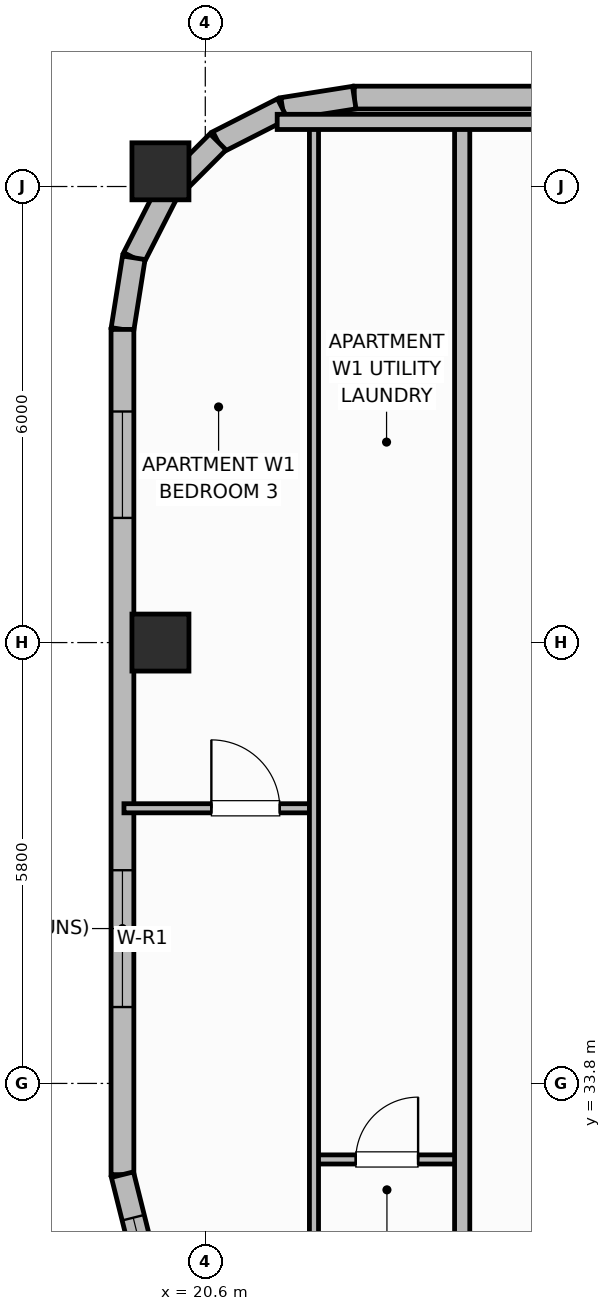
"""IFC4 building model, lengths in metres.
Left out: names, types, materials, properties, quantities, classifications, styles, units other than length and angle.
Written with IfcOpenShell. Run it as: python <this file> out.ifc"""

import sys

from ifc_helpers import new_model, si_unit, direction, frame, frame_2d, origin, origin_2d, place, context, subcontext, project, spatial, rectangle, extrude, element, fill, save


model = new_model("IFC4")
c1 = context("Model", 3, precision=1e-05, world=origin(), true_north=direction((0.0, 1.0)))
c2 = subcontext(c1, "Body", "Model", "MODEL_VIEW")
j1 = project(units=[si_unit("LENGTHUNIT", "METRE"), si_unit("PLANEANGLEUNIT", "RADIAN")], contexts=[c1])
p1 = place(None, origin())
s1 = spatial("IfcSite", under=j1, at=p1, CompositionType="ELEMENT")
p2 = place(p1, origin())
s2 = spatial("IfcBuilding", under=s1, at=p2, CompositionType="ELEMENT")
p3 = place(p2, frame((0.0, 0.0, 263.9)))
s3 = spatial("IfcBuildingStorey", under=s2, at=p3, CompositionType="ELEMENT", Elevation=263.9)
for number, where, z_axis, x_axis in (
    (1, (20.01, 39.6, 0.0), (0.0, 0.0, 1.0), (1.0, 0.0, 0.0)),
    (2, (20.01, 45.8, 0.0), (0.0, 0.0, 1.0), (1.0, 0.0, 0.0)),
):
    element("IfcColumn", number, at=place(p3, frame(where, z_axis=z_axis, x_axis=x_axis)), inside=s3, PredefinedType="COLUMN", context=c2, shape_type="SweptSolid", body=[
        extrude(rectangle(XDim=0.75, YDim=0.75, at=origin_2d()), origin(), (0.0, 0.0, 1.0), 3.7),
    ])
p4 = place(p3, frame((55.84, 46.77, 0.0), z_axis=(0.0, 0.0, 1.0), x_axis=(-1.0, 0.0, 0.0)))
e3 = element("IfcWall", 3, at=p4, inside=s3, PredefinedType="SOLIDWALL", context=c2, shape_type="SweptSolid", body=[
    extrude(rectangle(XDim=33.28, YDim=0.3, at=frame_2d((16.64, 0.0))), origin(), (0.0, 0.0, 1.0), 2.73),
])
p5 = place(p4, frame((5.596, 0.0, 0.71)))
e4 = element("IfcOpeningElement", 4, at=p5, cuts=e3, PredefinedType="OPENING", context=c2, shape_type="SweptSolid", body=[
    extrude(rectangle(XDim=2.1, YDim=1.9, at=frame_2d((1.05, 0.95))), frame((0.0, 0.16, 0.0), z_axis=(0.0, -1.0, 0.0), x_axis=(1.0, 0.0, 0.0)), (0.0, 0.0, 1.0), 0.32),
])
p6 = place(p4, frame((9.244, 0.0, 0.71)))
e5 = element("IfcOpeningElement", 5, at=p6, cuts=e3, PredefinedType="OPENING", context=c2, shape_type="SweptSolid", body=[
    extrude(rectangle(XDim=2.1, YDim=1.9, at=frame_2d((1.05, 0.95))), frame((0.0, 0.16, 0.0), z_axis=(0.0, -1.0, 0.0), x_axis=(1.0, 0.0, 0.0)), (0.0, 0.0, 1.0), 0.32),
])
p7 = place(p4, frame((13.941, 0.0, 0.71)))
e6 = element("IfcOpeningElement", 6, at=p7, cuts=e3, PredefinedType="OPENING", context=c2, shape_type="SweptSolid", body=[
    extrude(rectangle(XDim=2.1, YDim=1.9, at=frame_2d((1.05, 0.95))), frame((0.0, 0.16, 0.0), z_axis=(0.0, -1.0, 0.0), x_axis=(1.0, 0.0, 0.0)), (0.0, 0.0, 1.0), 0.32),
])
p8 = place(p4, frame((17.239, 0.0, 0.71)))
e7 = element("IfcOpeningElement", 7, at=p8, cuts=e3, PredefinedType="OPENING", context=c2, shape_type="SweptSolid", body=[
    extrude(rectangle(XDim=2.1, YDim=1.9, at=frame_2d((1.05, 0.95))), frame((0.0, 0.16, 0.0), z_axis=(0.0, -1.0, 0.0), x_axis=(1.0, 0.0, 0.0)), (0.0, 0.0, 1.0), 0.32),
])
p9 = place(p4, frame((21.936, 0.0, 0.71)))
e8 = element("IfcOpeningElement", 8, at=p9, cuts=e3, PredefinedType="OPENING", context=c2, shape_type="SweptSolid", body=[
    extrude(rectangle(XDim=2.1, YDim=1.9, at=frame_2d((1.05, 0.95))), frame((0.0, 0.16, 0.0), z_axis=(0.0, -1.0, 0.0), x_axis=(1.0, 0.0, 0.0)), (0.0, 0.0, 1.0), 0.32),
])
p10 = place(p4, frame((25.584, 0.0, 0.71)))
e9 = element("IfcOpeningElement", 9, at=p10, cuts=e3, PredefinedType="OPENING", context=c2, shape_type="SweptSolid", body=[
    extrude(rectangle(XDim=2.1, YDim=1.9, at=frame_2d((1.05, 0.95))), frame((0.0, 0.16, 0.0), z_axis=(0.0, -1.0, 0.0), x_axis=(1.0, 0.0, 0.0)), (0.0, 0.0, 1.0), 0.32),
])
p11 = place(p3, frame((22.56, 46.77, 0.0), z_axis=(0.0, 0.0, 1.0), x_axis=(-0.987669453596, -0.156553666304, 0.0)))
e10 = element("IfcWall", 10, at=p11, inside=s3, PredefinedType="SOLIDWALL", context=c2, shape_type="SweptSolid", body=[
    extrude(rectangle(XDim=0.954, YDim=0.3, at=frame_2d((0.477, 0.0))), origin(), (0.0, 0.0, 1.0), 2.73),
])
p12 = place(p3, frame((21.617, 46.621, 0.0), z_axis=(0.0, 0.0, 1.0), x_axis=(-0.891023873617, -0.45395644796, 0.0)))
e11 = element("IfcWall", 11, at=p12, inside=s3, PredefinedType="SOLIDWALL", context=c2, shape_type="SweptSolid", body=[
    extrude(rectangle(XDim=0.954, YDim=0.3, at=frame_2d((0.477, 0.0))), origin(), (0.0, 0.0, 1.0), 2.73),
])
p13 = place(p3, frame((20.767, 46.188, 0.0), z_axis=(0.0, 0.0, 1.0), x_axis=(-0.707106781187, -0.707106781187, 0.0)))
e12 = element("IfcWall", 12, at=p13, inside=s3, PredefinedType="SOLIDWALL", context=c2, shape_type="SweptSolid", body=[
    extrude(rectangle(XDim=0.954, YDim=0.3, at=frame_2d((0.477, 0.0))), origin(), (0.0, 0.0, 1.0), 2.73),
])
p14 = place(p3, frame((20.093, 45.513, 0.0), z_axis=(0.0, 0.0, 1.0), x_axis=(-0.454159573051, -0.890920356825, 0.0)))
e13 = element("IfcWall", 13, at=p14, inside=s3, PredefinedType="SOLIDWALL", context=c2, shape_type="SweptSolid", body=[
    extrude(rectangle(XDim=0.954, YDim=0.3, at=frame_2d((0.477, 0.0))), origin(), (0.0, 0.0, 1.0), 2.73),
])
p15 = place(p3, frame((19.659, 44.663, 0.0), z_axis=(0.0, 0.0, 1.0), x_axis=(-0.156304114255, -0.987708977314, 0.0)))
e14 = element("IfcWall", 14, at=p15, inside=s3, PredefinedType="SOLIDWALL", context=c2, shape_type="SweptSolid", body=[
    extrude(rectangle(XDim=0.954, YDim=0.3, at=frame_2d((0.477, 0.0))), origin(), (0.0, 0.0, 1.0), 2.73),
])
p16 = place(p3, frame((19.51, 43.72, 0.0), z_axis=(0.0, 0.0, 1.0), x_axis=(0.0, -1.0, 0.0)))
e15 = element("IfcWall", 15, at=p16, inside=s3, PredefinedType="SOLIDWALL", context=c2, shape_type="SweptSolid", body=[
    extrude(rectangle(XDim=11.12, YDim=0.3, at=frame_2d((5.56, 0.0))), origin(), (0.0, 0.0, 1.0), 2.73),
])
p17 = place(p16, frame((1.08, 0.0, 0.72)))
e16 = element("IfcOpeningElement", 16, at=p17, cuts=e15, PredefinedType="OPENING", context=c2, shape_type="SweptSolid", body=[
    extrude(rectangle(XDim=1.4, YDim=1.85, at=frame_2d((0.7, 0.925))), frame((0.0, 0.16, 0.0), z_axis=(0.0, -1.0, 0.0), x_axis=(1.0, 0.0, 0.0)), (0.0, 0.0, 1.0), 0.32),
])
p18 = place(p16, frame((7.115, 0.0, 0.76)))
e17 = element("IfcOpeningElement", 17, at=p18, cuts=e15, PredefinedType="OPENING", context=c2, shape_type="SweptSolid", body=[
    extrude(rectangle(XDim=1.8, YDim=1.85, at=frame_2d((0.9, 0.925))), frame((0.0, 0.16, 0.0), z_axis=(0.0, -1.0, 0.0), x_axis=(1.0, 0.0, 0.0)), (0.0, 0.0, 1.0), 0.32),
])
p19 = place(p3, frame((19.51, 32.6, 0.0), z_axis=(0.0, 0.0, 1.0), x_axis=(0.242535625036, -0.970142500145, 0.0)))
e18 = element("IfcWall", 18, at=p19, inside=s3, PredefinedType="SOLIDWALL", context=c2, shape_type="SweptSolid", body=[
    extrude(rectangle(XDim=2.268, YDim=0.3, at=frame_2d((1.134, 0.0))), origin(), (0.0, 0.0, 1.0), 2.73),
])
p20 = place(p19, frame((0.584, 0.0, 0.92)))
e19 = element("IfcOpeningElement", 19, at=p20, cuts=e18, PredefinedType="OPENING", context=c2, shape_type="SweptSolid", body=[
    extrude(rectangle(XDim=1.1, YDim=1.65, at=frame_2d((0.55, 0.825))), frame((0.0, 0.16, 0.0), z_axis=(0.0, -1.0, 0.0), x_axis=(1.0, 0.0, 0.0)), (0.0, 0.0, 1.0), 0.32),
])
p21 = place(p3, frame((22.03, 32.8, 0.0), z_axis=(0.0, 0.0, 1.0), x_axis=(1.0, 0.0, 0.0)))
e20 = element("IfcWall", 20, at=p21, inside=s3, PredefinedType="PARTITIONING", context=c2, shape_type="SweptSolid", body=[
    extrude(rectangle(XDim=1.95, YDim=0.12, at=frame_2d((0.975, 0.0))), origin(), (0.0, 0.0, 1.0), 2.56),
])
p22 = place(p21, frame((0.55, 0.0, 0.0)))
e21 = element("IfcOpeningElement", 21, at=p22, cuts=e20, PredefinedType="OPENING", context=c2, shape_type="SweptSolid", body=[
    extrude(rectangle(XDim=0.82, YDim=2.08, at=frame_2d((0.41, 1.04))), frame((0.0, 0.07, 0.0), z_axis=(0.0, -1.0, 0.0), x_axis=(1.0, 0.0, 0.0)), (0.0, 0.0, 1.0), 0.14),
])
p23 = place(p3, frame((19.53, 37.42, 0.0), z_axis=(0.0, 0.0, 1.0), x_axis=(1.0, 0.0, 0.0)))
e22 = element("IfcWall", 22, at=p23, inside=s3, PredefinedType="PARTITIONING", context=c2, shape_type="SweptSolid", body=[
    extrude(rectangle(XDim=2.5, YDim=0.12, at=frame_2d((1.25, 0.0))), origin(), (0.0, 0.0, 1.0), 2.56),
])
p24 = place(p23, frame((1.15, 0.0, 0.0)))
e23 = element("IfcOpeningElement", 23, at=p24, cuts=e22, PredefinedType="OPENING", context=c2, shape_type="SweptSolid", body=[
    extrude(rectangle(XDim=0.9, YDim=2.1, at=frame_2d((0.45, 1.05))), frame((0.0, 0.07, 0.0), z_axis=(0.0, -1.0, 0.0), x_axis=(1.0, 0.0, 0.0)), (0.0, 0.0, 1.0), 0.14),
])
p25 = place(p3, frame((22.03, 9.99, 0.0), z_axis=(0.0, 0.0, 1.0), x_axis=(0.0, 1.0, 0.0)))
e24 = element("IfcWall", 24, at=p25, inside=s3, PredefinedType="PARTITIONING", context=c2, shape_type="SweptSolid", body=[
    extrude(rectangle(XDim=36.42, YDim=0.12, at=frame_2d((18.21, 0.0))), origin(), (0.0, 0.0, 1.0), 2.56),
])
p26 = place(p25, frame((0.41, 0.0, 0.0)))
e25 = element("IfcOpeningElement", 25, at=p26, cuts=e24, PredefinedType="OPENING", context=c2, shape_type="SweptSolid", body=[
    extrude(rectangle(XDim=0.9, YDim=2.1, at=frame_2d((0.45, 1.05))), frame((0.0, 0.07, 0.0), z_axis=(0.0, -1.0, 0.0), x_axis=(1.0, 0.0, 0.0)), (0.0, 0.0, 1.0), 0.14),
])
p27 = place(p25, frame((15.56, 0.0, 0.0)))
e26 = element("IfcOpeningElement", 26, at=p27, cuts=e24, PredefinedType="OPENING", context=c2, shape_type="SweptSolid", body=[
    extrude(rectangle(XDim=0.82, YDim=2.08, at=frame_2d((0.41, 1.04))), frame((0.0, 0.07, 0.0), z_axis=(0.0, -1.0, 0.0), x_axis=(1.0, 0.0, 0.0)), (0.0, 0.0, 1.0), 0.14),
])
p28 = place(p3, frame((23.98, 9.95, 0.0), z_axis=(0.0, 0.0, 1.0), x_axis=(0.0, 1.0, 0.0)))
e27 = element("IfcWall", 27, at=p28, inside=s3, PredefinedType="PARTITIONING", context=c2, shape_type="SweptSolid", body=[
    extrude(rectangle(XDim=36.5, YDim=0.2, at=frame_2d((18.25, 0.0))), origin(), (0.0, 0.0, 1.0), 2.56),
])
p29 = place(p28, frame((3.25, 0.0, 0.0)))
e28 = element("IfcOpeningElement", 28, at=p29, cuts=e27, PredefinedType="OPENING", context=c2, shape_type="SweptSolid", body=[
    extrude(rectangle(XDim=1.0, YDim=2.15, at=frame_2d((0.5, 1.075))), frame((0.0, 0.11, 0.0), z_axis=(0.0, -1.0, 0.0), x_axis=(1.0, 0.0, 0.0)), (0.0, 0.0, 1.0), 0.22),
])
p30 = place(p3, frame((21.546, 46.45, 0.0), z_axis=(0.0, 0.0, 1.0), x_axis=(1.0, 0.0, 0.0)))
e29 = element("IfcWall", 29, at=p30, inside=s3, PredefinedType="PARTITIONING", context=c2, shape_type="SweptSolid", body=[
    extrude(rectangle(XDim=3.754, YDim=0.2, at=frame_2d((1.877, 0.0))), origin(), (0.0, 0.0, 1.0), 2.56),
])
p31 = place(p17, origin())
e30 = element("IfcWindow", 30, at=p31, inside=s3, PartitioningType="SINGLE_PANEL", PredefinedType="WINDOW", context=c2, shape_type="SweptSolid", body=[
    extrude(rectangle(XDim=1.4, YDim=1.85, at=frame_2d((0.7, 0.925))), frame((0.0, 0.03, 0.0), z_axis=(0.0, -1.0, 0.0), x_axis=(1.0, 0.0, 0.0)), (0.0, 0.0, 1.0), 0.06),
])
fill(e16, e30)
p32 = place(p18, origin())
e31 = element("IfcWindow", 31, at=p32, inside=s3, PartitioningType="SINGLE_PANEL", PredefinedType="WINDOW", context=c2, shape_type="SweptSolid", body=[
    extrude(rectangle(XDim=1.8, YDim=1.85, at=frame_2d((0.9, 0.925))), frame((0.0, 0.03, 0.0), z_axis=(0.0, -1.0, 0.0), x_axis=(1.0, 0.0, 0.0)), (0.0, 0.0, 1.0), 0.06),
])
fill(e17, e31)
p33 = place(p20, origin())
e32 = element("IfcWindow", 32, at=p33, inside=s3, PartitioningType="SINGLE_PANEL", PredefinedType="WINDOW", context=c2, shape_type="SweptSolid", body=[
    extrude(rectangle(XDim=1.1, YDim=1.65, at=frame_2d((0.55, 0.825))), frame((0.0, 0.03, 0.0), z_axis=(0.0, -1.0, 0.0), x_axis=(1.0, 0.0, 0.0)), (0.0, 0.0, 1.0), 0.06),
])
fill(e19, e32)
p34 = place(p22, origin())
e33 = element("IfcDoor", 33, at=p34, inside=s3, OperationType="SINGLE_SWING_RIGHT", PredefinedType="DOOR", context=c2, shape_type="SweptSolid", body=[
    extrude(rectangle(XDim=0.82, YDim=2.08, at=frame_2d((0.41, 1.04))), frame((0.0, 0.025, 0.0), z_axis=(0.0, -1.0, 0.0), x_axis=(1.0, 0.0, 0.0)), (0.0, 0.0, 1.0), 0.05),
])
fill(e21, e33)
p35 = place(p24, origin())
e34 = element("IfcDoor", 34, at=p35, inside=s3, OperationType="SINGLE_SWING_LEFT", PredefinedType="DOOR", context=c2, shape_type="SweptSolid", body=[
    extrude(rectangle(XDim=0.9, YDim=2.1, at=frame_2d((0.45, 1.05))), frame((0.0, 0.025, 0.0), z_axis=(0.0, -1.0, 0.0), x_axis=(1.0, 0.0, 0.0)), (0.0, 0.0, 1.0), 0.05),
])
fill(e23, e34)
save(model, sys.argv[1])
